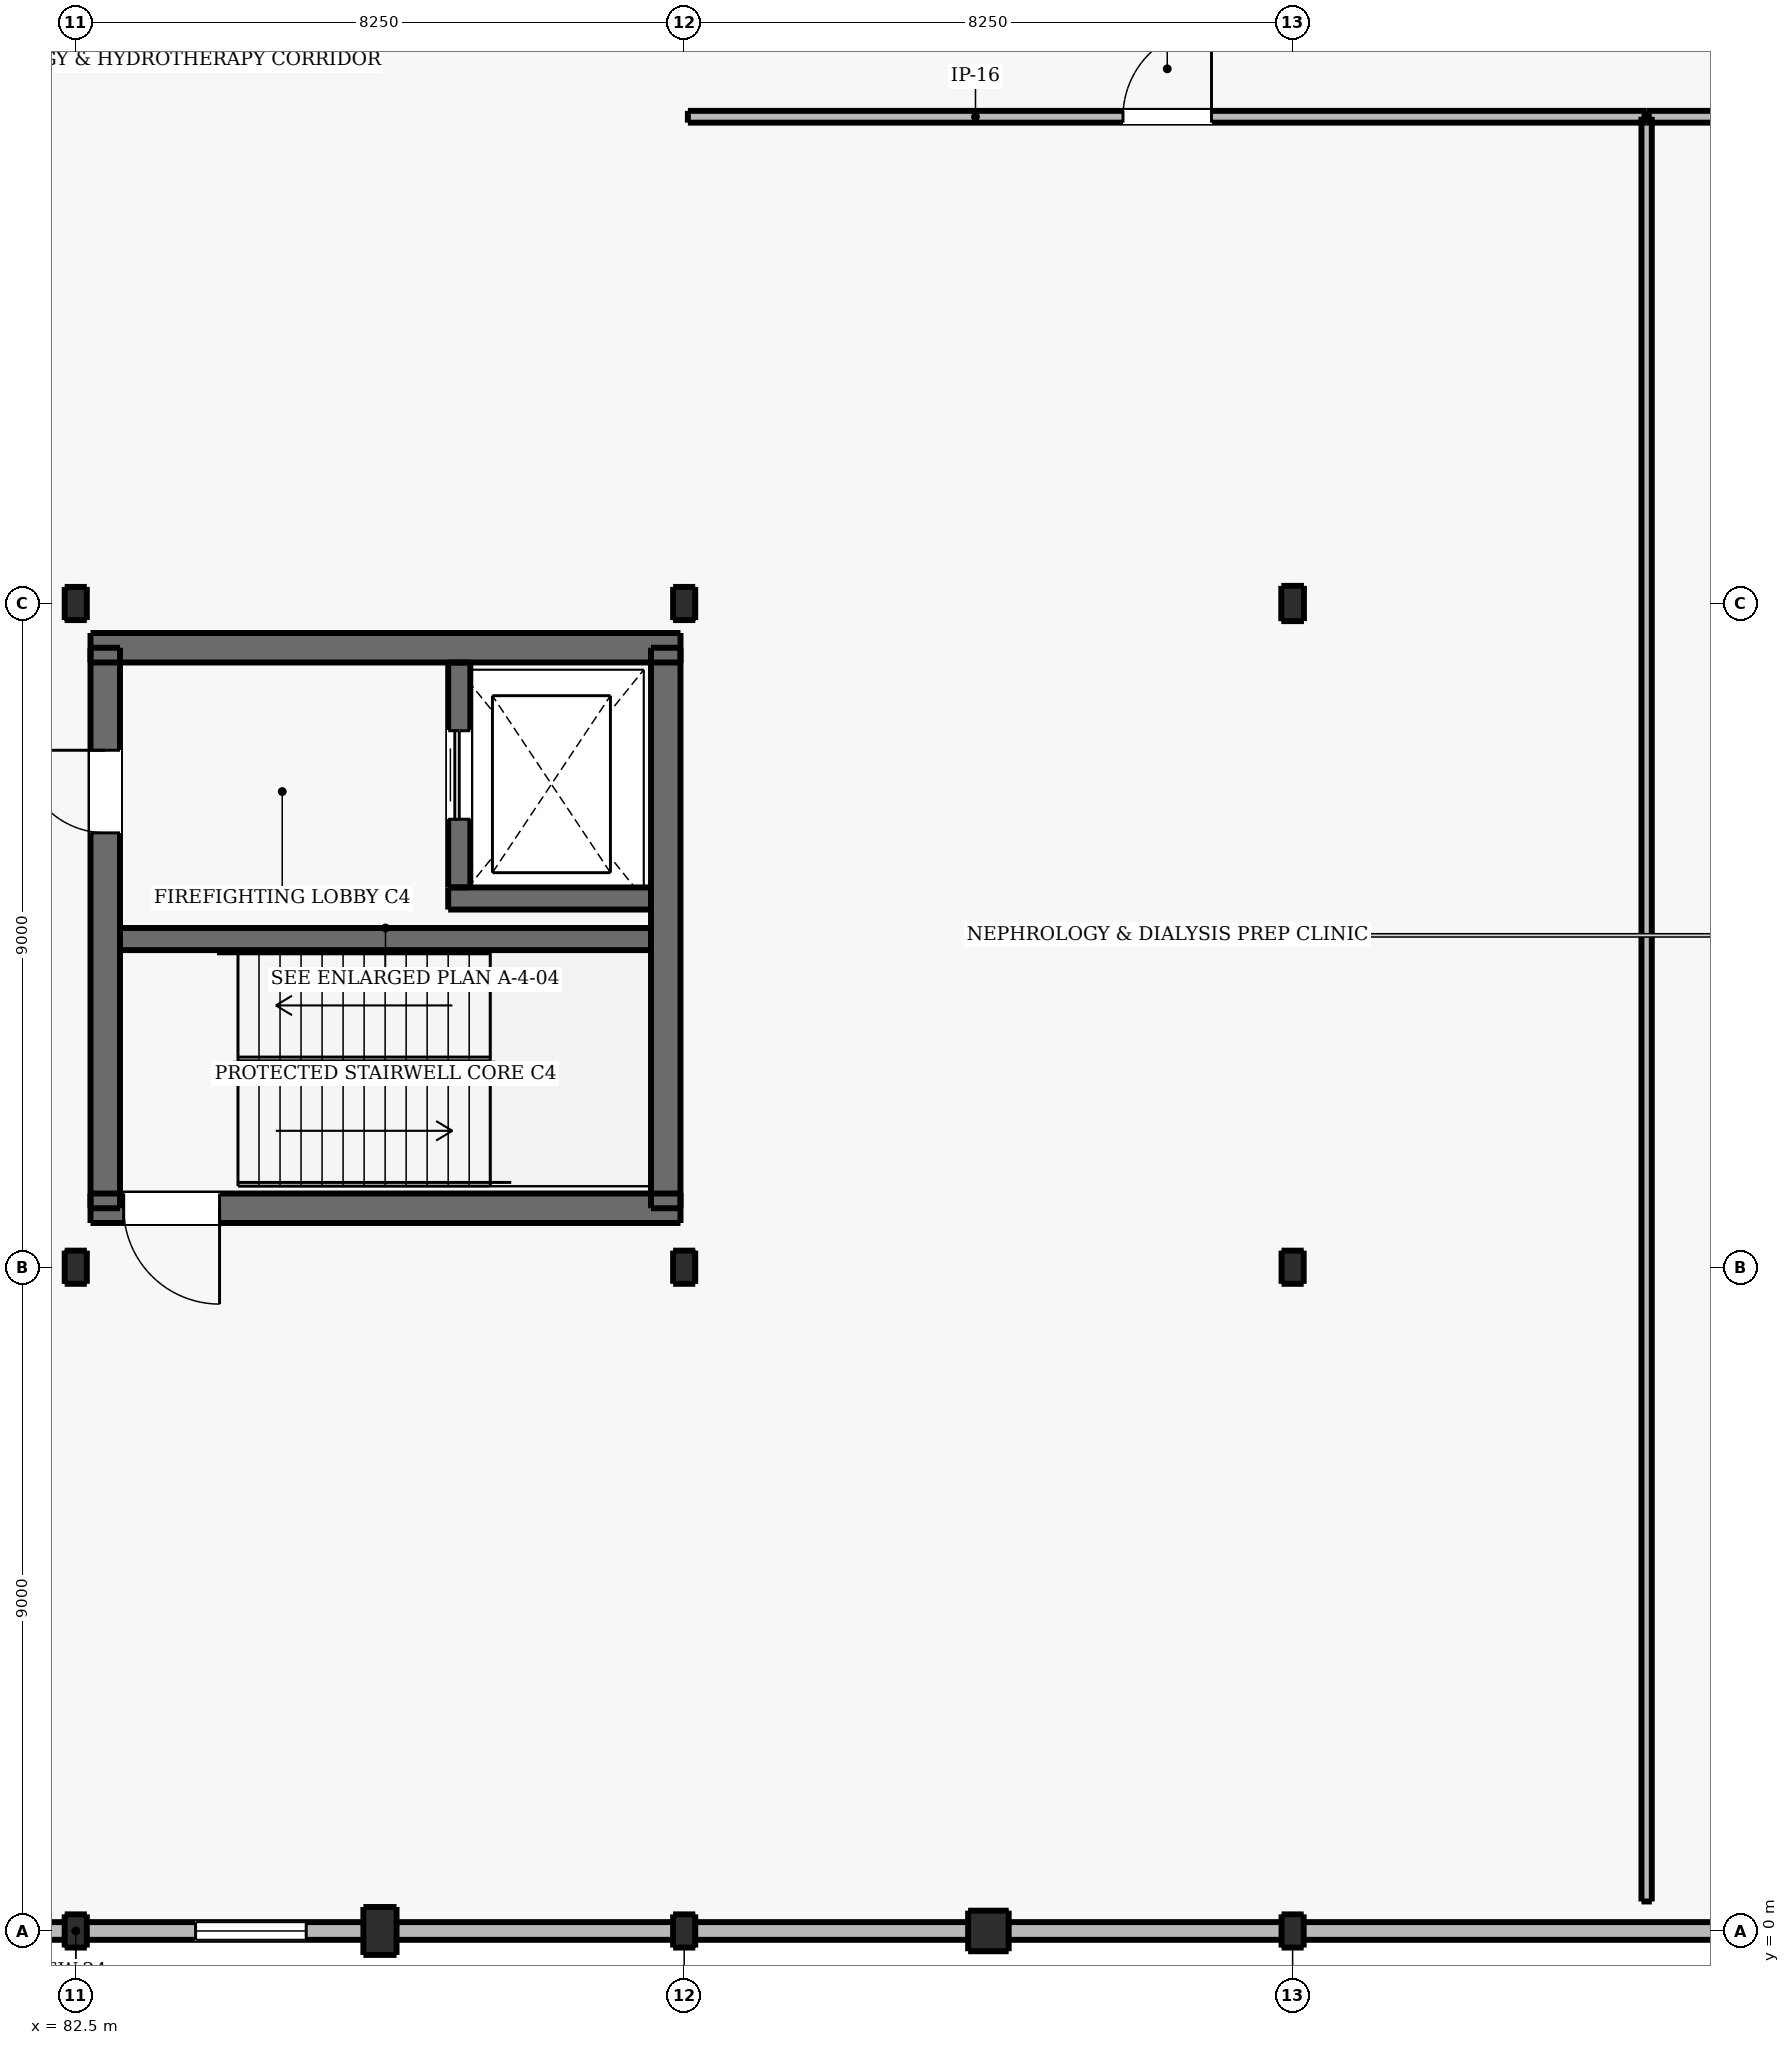
"""IFC4 building model, lengths in metres.
Left out: names, types, materials, properties, quantities, classifications, styles, units other than length and angle.
Written with IfcOpenShell. Run it as: python <this file> out.ifc"""

import sys

from ifc_helpers import new_model, si_unit, direction, frame, frame_2d, origin, origin_2d, place, context, subcontext, project, spatial, rectangle, i_section, extrude, element, fill, save


model = new_model("IFC4")
c1 = context("Model", 3, precision=1e-05, world=origin(), true_north=direction((0.0, 1.0)))
c2 = subcontext(c1, "Body", "Model", "MODEL_VIEW")
j1 = project(units=[si_unit("LENGTHUNIT", "METRE"), si_unit("PLANEANGLEUNIT", "RADIAN")], contexts=[c1])
p1 = place(None, origin())
s1 = spatial("IfcSite", under=j1, at=p1, CompositionType="ELEMENT")
p2 = place(p1, origin())
s2 = spatial("IfcBuilding", under=s1, at=p2, CompositionType="ELEMENT")
p3 = place(p2, frame((0.0, 0.0, 5.1)))
s3 = spatial("IfcBuildingStorey", under=s2, at=p3, CompositionType="ELEMENT", Elevation=5.1)
for number, where, z_axis, x_axis in (
    (1, (82.5, 0.0, 0.0), (0.0, 0.0, 1.0), (1.0, 0.0, 0.0)),
    (2, (82.5, 9.0, 0.0), (0.0, 0.0, 1.0), (1.0, 0.0, 0.0)),
    (3, (82.5, 18.0, 0.0), (0.0, 0.0, 1.0), (1.0, 0.0, 0.0)),
):
    element("IfcColumn", number, at=place(p3, frame(where, z_axis=z_axis, x_axis=x_axis)), inside=s3, PredefinedType="COLUMN", context=c2, shape_type="SweptSolid", body=[
        extrude(i_section(OverallWidth=0.3, OverallDepth=0.45, WebThickness=0.014, FlangeThickness=0.026, FilletRadius=0.027, at=origin_2d()), origin(), (0.0, 0.0, 1.0), 4.5),
    ])
p4 = place(p3, frame((86.625, 0.0, 0.0), z_axis=(0.0, 0.0, 1.0), x_axis=(1.0, 0.0, 0.0)))
e4 = element("IfcColumn", 4, at=p4, inside=s3, PredefinedType="PILASTER", context=c2, shape_type="SweptSolid", body=[
    extrude(rectangle(XDim=0.45, YDim=0.65, at=origin_2d()), origin(), (0.0, 0.0, 1.0), 4.5),
])
for number, where, z_axis, x_axis in (
    (5, (90.75, 0.0, 0.0), (0.0, 0.0, 1.0), (1.0, 0.0, 0.0)),
    (6, (90.75, 9.0, 0.0), (0.0, 0.0, 1.0), (1.0, 0.0, 0.0)),
    (7, (90.75, 18.0, 0.0), (0.0, 0.0, 1.0), (1.0, 0.0, 0.0)),
):
    element("IfcColumn", number, at=place(p3, frame(where, z_axis=z_axis, x_axis=x_axis)), inside=s3, PredefinedType="COLUMN", context=c2, shape_type="SweptSolid", body=[
        extrude(i_section(OverallWidth=0.3, OverallDepth=0.45, WebThickness=0.014, FlangeThickness=0.026, FilletRadius=0.027, at=origin_2d()), origin(), (0.0, 0.0, 1.0), 4.5),
    ])
p5 = place(p3, frame((94.875, 0.0, 0.0), z_axis=(0.0, 0.0, 1.0), x_axis=(1.0, 0.0, 0.0)))
e8 = element("IfcColumn", 8, at=p5, inside=s3, PredefinedType="PILASTER", context=c2, shape_type="SweptSolid", body=[
    extrude(rectangle(XDim=0.55, YDim=0.55, at=origin_2d()), origin(), (0.0, 0.0, 1.0), 4.5),
])
for number, where, z_axis, x_axis in (
    (9, (99.0, 0.0, 0.0), (0.0, 0.0, 1.0), (1.0, 0.0, 0.0)),
    (10, (99.0, 9.0, 0.0), (0.0, 0.0, 1.0), (1.0, 0.0, 0.0)),
):
    element("IfcColumn", number, at=place(p3, frame(where, z_axis=z_axis, x_axis=x_axis)), inside=s3, PredefinedType="COLUMN", context=c2, shape_type="SweptSolid", body=[
        extrude(i_section(OverallWidth=0.3, OverallDepth=0.45, WebThickness=0.014, FlangeThickness=0.026, FilletRadius=0.027, at=origin_2d()), origin(), (0.0, 0.0, 1.0), 4.5),
    ])
p6 = place(p3, frame((99.0, 18.0, 0.0), z_axis=(0.0, 0.0, 1.0), x_axis=(1.0, 0.0, 0.0)))
e11 = element("IfcColumn", 11, at=p6, inside=s3, PredefinedType="COLUMN", context=c2, shape_type="SweptSolid", body=[
    extrude(i_section(OverallWidth=0.307, OverallDepth=0.478, WebThickness=0.021, FlangeThickness=0.04, FilletRadius=0.027, at=origin_2d()), origin(), (0.0, 0.0, 1.0), 4.5),
])
p7 = place(p3, frame((82.7, 9.8, 0.0), z_axis=(0.0, 0.0, 1.0), x_axis=(1.0, 0.0, 0.0)))
e12 = element("IfcWall", 12, at=p7, inside=s3, PredefinedType="SHEAR", context=c2, shape_type="SweptSolid", body=[
    extrude(rectangle(XDim=8.0, YDim=0.4, at=frame_2d((4.0, 0.0))), origin(), (0.0, 0.0, 1.0), 4.5),
])
p8 = place(p7, frame((0.45, 0.0, 0.0)))
e13 = element("IfcOpeningElement", 13, at=p8, cuts=e12, PredefinedType="OPENING", context=c2, shape_type="SweptSolid", body=[
    extrude(rectangle(XDim=1.3, YDim=2.15, at=frame_2d((0.65, 1.075))), frame((0.0, 0.21, 0.0), z_axis=(0.0, -1.0, 0.0), x_axis=(1.0, 0.0, 0.0)), (0.0, 0.0, 1.0), 0.42),
])
p9 = place(p3, frame((82.7, 17.4, 0.0), z_axis=(0.0, 0.0, 1.0), x_axis=(1.0, 0.0, 0.0)))
e14 = element("IfcWall", 14, at=p9, inside=s3, PredefinedType="SHEAR", context=c2, shape_type="SweptSolid", body=[
    extrude(rectangle(XDim=8.0, YDim=0.4, at=frame_2d((4.0, 0.0))), origin(), (0.0, 0.0, 1.0), 4.5),
])
p10 = place(p3, frame((82.9, 9.8, 0.0), z_axis=(0.0, 0.0, 1.0), x_axis=(0.0, 1.0, 0.0)))
e15 = element("IfcWall", 15, at=p10, inside=s3, PredefinedType="SHEAR", context=c2, shape_type="SweptSolid", body=[
    extrude(rectangle(XDim=7.6, YDim=0.4, at=frame_2d((3.8, 0.0))), origin(), (0.0, 0.0, 1.0), 4.5),
])
p11 = place(p10, frame((5.09, 0.0, 0.0)))
e16 = element("IfcOpeningElement", 16, at=p11, cuts=e15, PredefinedType="OPENING", context=c2, shape_type="SweptSolid", body=[
    extrude(rectangle(XDim=1.12, YDim=2.15, at=frame_2d((0.56, 1.075))), frame((0.0, 0.21, 0.0), z_axis=(0.0, -1.0, 0.0), x_axis=(1.0, 0.0, 0.0)), (0.0, 0.0, 1.0), 0.42),
])
p12 = place(p3, frame((90.5, 9.8, 0.0), z_axis=(0.0, 0.0, 1.0), x_axis=(0.0, 1.0, 0.0)))
e17 = element("IfcWall", 17, at=p12, inside=s3, PredefinedType="SHEAR", context=c2, shape_type="SweptSolid", body=[
    extrude(rectangle(XDim=7.6, YDim=0.4, at=frame_2d((3.8, 0.0))), origin(), (0.0, 0.0, 1.0), 4.5),
])
p13 = place(p3, frame((83.1, 13.45, 0.0), z_axis=(0.0, 0.0, 1.0), x_axis=(1.0, 0.0, 0.0)))
e18 = element("IfcWall", 18, at=p13, inside=s3, PredefinedType="SHEAR", context=c2, shape_type="SweptSolid", body=[
    extrude(rectangle(XDim=7.2, YDim=0.3, at=frame_2d((3.6, 0.0))), origin(), (0.0, 0.0, 1.0), 4.5),
])
p14 = place(p3, frame((87.55, 14.0, 0.0), z_axis=(0.0, 0.0, 1.0), x_axis=(1.0, 0.0, 0.0)))
e19 = element("IfcWall", 19, at=p14, inside=s3, PredefinedType="SHEAR", context=c2, shape_type="SweptSolid", body=[
    extrude(rectangle(XDim=2.75, YDim=0.3, at=frame_2d((1.375, 0.0))), origin(), (0.0, 0.0, 1.0), 4.5),
])
p15 = place(p3, frame((87.7, 14.15, 0.0), z_axis=(0.0, 0.0, 1.0), x_axis=(0.0, 1.0, 0.0)))
e20 = element("IfcWall", 20, at=p15, inside=s3, PredefinedType="SHEAR", context=c2, shape_type="SweptSolid", body=[
    extrude(rectangle(XDim=3.05, YDim=0.3, at=frame_2d((1.525, 0.0))), origin(), (0.0, 0.0, 1.0), 4.5),
])
p16 = place(p15, frame((0.925, 0.0, 0.0)))
e21 = element("IfcOpeningElement", 21, at=p16, cuts=e20, PredefinedType="OPENING", context=c2, shape_type="SweptSolid", body=[
    extrude(rectangle(XDim=1.2, YDim=2.15, at=frame_2d((0.6, 1.075))), frame((0.0, 0.16, 0.0), z_axis=(0.0, -1.0, 0.0), x_axis=(1.0, 0.0, 0.0)), (0.0, 0.0, 1.0), 0.32),
])
p17 = place(p3, frame((111.0, 0.0, 0.0), z_axis=(0.0, 0.0, 1.0), x_axis=(-1.0, 0.0, 0.0)))
e22 = element("IfcWall", 22, at=p17, inside=s3, PredefinedType="SOLIDWALL", context=c2, shape_type="SweptSolid", body=[
    extrude(rectangle(XDim=57.0, YDim=0.24, at=frame_2d((28.5, 0.0))), origin(), (0.0, 0.0, 1.0), 3.28),
])
p18 = place(p17, frame((1.625, 0.0, 0.95)))
e23 = element("IfcOpeningElement", 23, at=p18, cuts=e22, PredefinedType="OPENING", context=c2, shape_type="SweptSolid", body=[
    extrude(rectangle(XDim=1.5, YDim=1.6, at=frame_2d((0.75, 0.8))), frame((0.0, 0.13, 0.0), z_axis=(0.0, -1.0, 0.0), x_axis=(1.0, 0.0, 0.0)), (0.0, 0.0, 1.0), 0.26),
])
p19 = place(p17, frame((25.375, 0.0, 0.95)))
e24 = element("IfcOpeningElement", 24, at=p19, cuts=e22, PredefinedType="OPENING", context=c2, shape_type="SweptSolid", body=[
    extrude(rectangle(XDim=1.5, YDim=1.6, at=frame_2d((0.75, 0.8))), frame((0.0, 0.13, 0.0), z_axis=(0.0, -1.0, 0.0), x_axis=(1.0, 0.0, 0.0)), (0.0, 0.0, 1.0), 0.26),
])
p20 = place(p17, frame((30.125, 0.0, 0.95)))
e25 = element("IfcOpeningElement", 25, at=p20, cuts=e22, PredefinedType="OPENING", context=c2, shape_type="SweptSolid", body=[
    extrude(rectangle(XDim=1.5, YDim=1.6, at=frame_2d((0.75, 0.8))), frame((0.0, 0.13, 0.0), z_axis=(0.0, -1.0, 0.0), x_axis=(1.0, 0.0, 0.0)), (0.0, 0.0, 1.0), 0.26),
])
p21 = place(p3, frame((90.8, 24.6, 0.0), z_axis=(0.0, 0.0, 1.0), x_axis=(1.0, 0.0, 0.0)))
e26 = element("IfcWall", 26, at=p21, inside=s3, PredefinedType="PARTITIONING", context=c2, shape_type="SweptSolid", body=[
    extrude(rectangle(XDim=13.0, YDim=0.16, at=frame_2d((6.5, 0.0))), origin(), (0.0, 0.0, 1.0), 4.21),
])
p22 = place(p21, frame((5.9, 0.0, 0.0)))
e27 = element("IfcOpeningElement", 27, at=p22, cuts=e26, PredefinedType="OPENING", context=c2, shape_type="SweptSolid", body=[
    extrude(rectangle(XDim=1.2, YDim=2.2, at=frame_2d((0.6, 1.1))), frame((0.0, 0.09, 0.0), z_axis=(0.0, -1.0, 0.0), x_axis=(1.0, 0.0, 0.0)), (0.0, 0.0, 1.0), 0.18),
])
p23 = place(p3, frame((103.8, 0.4, 0.0), z_axis=(0.0, 0.0, 1.0), x_axis=(0.0, 1.0, 0.0)))
e28 = element("IfcWall", 28, at=p23, inside=s3, PredefinedType="PARTITIONING", context=c2, shape_type="SweptSolid", body=[
    extrude(rectangle(XDim=24.2, YDim=0.14, at=frame_2d((12.1, 0.0))), origin(), (0.0, 0.0, 1.0), 4.21),
])
p24 = place(p3, frame((103.8, 24.6, 0.0), z_axis=(0.0, 0.0, 1.0), x_axis=(1.0, 0.0, 0.0)))
e29 = element("IfcWall", 29, at=p24, inside=s3, PredefinedType="PARTITIONING", context=c2, shape_type="SweptSolid", body=[
    extrude(rectangle(XDim=6.8, YDim=0.16, at=frame_2d((3.4, 0.0))), origin(), (0.0, 0.0, 1.0), 4.21),
])
p25 = place(p24, frame((2.95, 0.0, 0.0)))
e30 = element("IfcOpeningElement", 30, at=p25, cuts=e29, PredefinedType="OPENING", context=c2, shape_type="SweptSolid", body=[
    extrude(rectangle(XDim=0.9, YDim=2.1, at=frame_2d((0.45, 1.05))), frame((0.0, 0.09, 0.0), z_axis=(0.0, -1.0, 0.0), x_axis=(1.0, 0.0, 0.0)), (0.0, 0.0, 1.0), 0.18),
])
p26 = place(p19, origin())
e31 = element("IfcWindow", 31, at=p26, inside=s3, PartitioningType="SINGLE_PANEL", PredefinedType="WINDOW", context=c2, shape_type="SweptSolid", body=[
    extrude(rectangle(XDim=1.5, YDim=1.6, at=frame_2d((0.75, 0.8))), frame((0.0, 0.03, 0.0), z_axis=(0.0, -1.0, 0.0), x_axis=(1.0, 0.0, 0.0)), (0.0, 0.0, 1.0), 0.06),
])
fill(e24, e31)
p27 = place(p16, origin())
e32 = element("IfcDoor", 32, at=p27, inside=s3, OperationType="DOUBLE_DOOR_SLIDING", PredefinedType="DOOR", context=c2, shape_type="SweptSolid", body=[
    extrude(rectangle(XDim=1.2, YDim=2.15, at=frame_2d((0.6, 1.075))), frame((0.0, 0.025, 0.0), z_axis=(0.0, -1.0, 0.0), x_axis=(1.0, 0.0, 0.0)), (0.0, 0.0, 1.0), 0.05),
])
fill(e21, e32)
p28 = place(p11, origin())
e33 = element("IfcDoor", 33, at=p28, inside=s3, OperationType="SINGLE_SWING_RIGHT", PredefinedType="DOOR", context=c2, shape_type="SweptSolid", body=[
    extrude(rectangle(XDim=1.12, YDim=2.15, at=frame_2d((0.56, 1.075))), frame((0.0, 0.025, 0.0), z_axis=(0.0, -1.0, 0.0), x_axis=(1.0, 0.0, 0.0)), (0.0, 0.0, 1.0), 0.05),
])
fill(e16, e33)
p29 = place(p8, frame((1.3, 0.0, 0.0), z_axis=(0.0, 0.0, 1.0), x_axis=(-1.0, 0.0, 0.0)))
e34 = element("IfcDoor", 34, at=p29, inside=s3, OperationType="SINGLE_SWING_RIGHT", PredefinedType="DOOR", context=c2, shape_type="SweptSolid", body=[
    extrude(rectangle(XDim=1.3, YDim=2.15, at=frame_2d((0.65, 1.075))), frame((0.0, 0.025, 0.0), z_axis=(0.0, -1.0, 0.0), x_axis=(1.0, 0.0, 0.0)), (0.0, 0.0, 1.0), 0.05),
])
fill(e13, e34)
p30 = place(p22, origin())
e35 = element("IfcDoor", 35, at=p30, inside=s3, OperationType="SINGLE_SWING_RIGHT", PredefinedType="DOOR", context=c2, shape_type="SweptSolid", body=[
    extrude(rectangle(XDim=1.2, YDim=2.2, at=frame_2d((0.6, 1.1))), frame((0.0, 0.025, 0.0), z_axis=(0.0, -1.0, 0.0), x_axis=(1.0, 0.0, 0.0)), (0.0, 0.0, 1.0), 0.05),
])
fill(e27, e35)
save(model, sys.argv[1])
